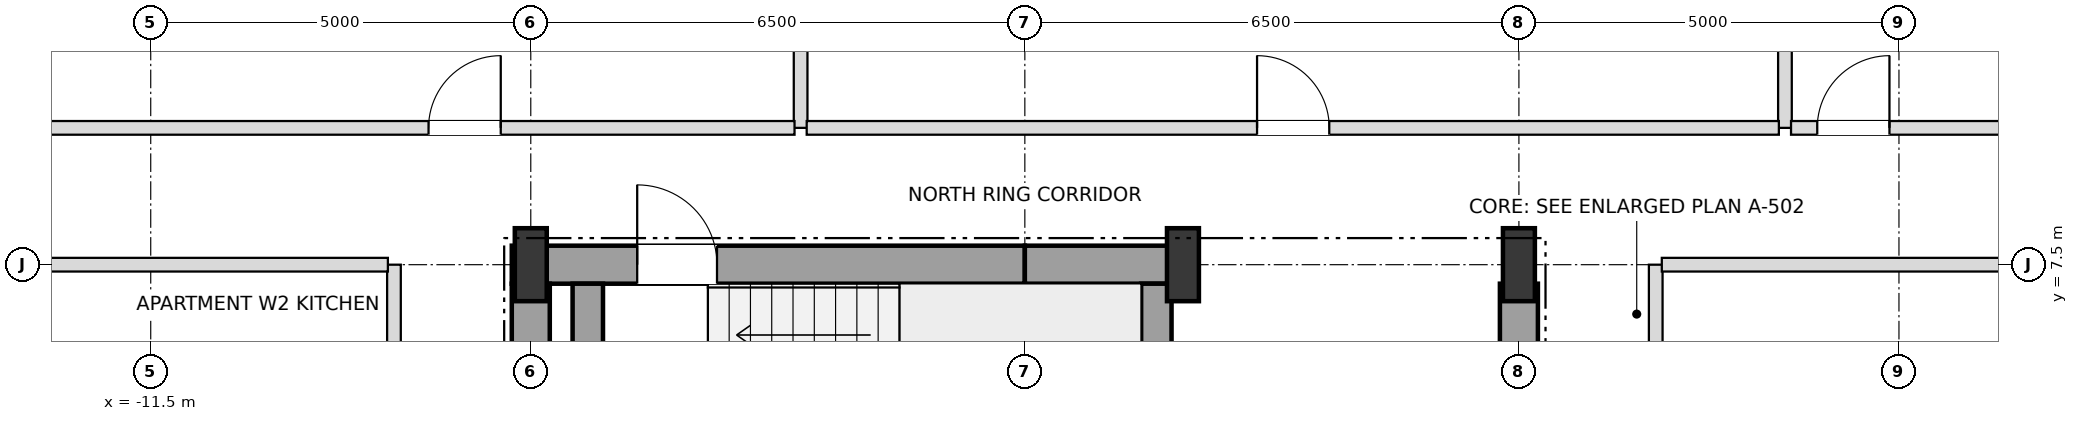
"""IFC4 building model, lengths in metres.
Left out: names, types, materials, properties, quantities, classifications, styles, units other than length and angle.
Written with IfcOpenShell. Run it as: python <this file> out.ifc"""

import sys

from ifc_helpers import new_model, si_unit, direction, frame, frame_2d, origin, origin_2d, place, context, subcontext, project, spatial, rectangle, i_section, extrude, element, fill, save


model = new_model("IFC4")
c1 = context("Model", 3, precision=1e-05, world=origin(), true_north=direction((0.0, 1.0)))
c2 = subcontext(c1, "Body", "Model", "MODEL_VIEW")
j1 = project(units=[si_unit("LENGTHUNIT", "METRE"), si_unit("PLANEANGLEUNIT", "RADIAN")], contexts=[c1])
p1 = place(None, origin())
s1 = spatial("IfcSite", under=j1, at=p1, CompositionType="ELEMENT")
p2 = place(p1, origin())
s2 = spatial("IfcBuilding", under=s1, at=p2, CompositionType="ELEMENT")
p3 = place(p2, frame((0.0, 0.0, 54.0)))
s3 = spatial("IfcBuildingStorey", under=s2, at=p3, CompositionType="ELEMENT", Elevation=54.0)
for number, where, z_axis, x_axis in (
    (1, (-6.5, 7.5, 0.0), (0.0, 0.0, 1.0), (1.0, 0.0, 0.0)),
    (2, (2.08, 7.5, 0.0), (0.0, 0.0, 1.0), (1.0, 0.0, 0.0)),
    (3, (6.5, 7.5, 0.0), (0.0, 0.0, 1.0), (1.0, 0.0, 0.0)),
):
    element("IfcColumn", number, at=place(p3, frame(where, z_axis=z_axis, x_axis=x_axis)), inside=s3, PredefinedType="COLUMN", context=c2, shape_type="SweptSolid", body=[
        extrude(i_section(OverallWidth=0.42, OverallDepth=0.96, WebThickness=0.022, FlangeThickness=0.034, at=origin_2d()), origin(), (0.0, 0.0, 1.0), 3.6),
    ])
p4 = place(p3, frame((-6.75, 7.5, 0.0), z_axis=(0.0, 0.0, 1.0), x_axis=(1.0, 0.0, 0.0)))
e4 = element("IfcWall", 4, at=p4, inside=s3, PredefinedType="SHEAR", context=c2, shape_type="SweptSolid", body=[
    extrude(rectangle(XDim=6.75, YDim=0.5, at=frame_2d((3.375, 0.0))), origin(), (0.0, 0.0, 1.0), 3.38),
])
p5 = place(p4, frame((1.65, 0.0, 0.0)))
e5 = element("IfcOpeningElement", 5, at=p5, cuts=e4, PredefinedType="OPENING", context=c2, shape_type="SweptSolid", body=[
    extrude(rectangle(XDim=1.05, YDim=2.15, at=frame_2d((0.525, 1.075))), frame((0.0, 0.26, 0.0), z_axis=(0.0, -1.0, 0.0), x_axis=(1.0, 0.0, 0.0)), (0.0, 0.0, 1.0), 0.52),
])
p6 = place(p3, frame((0.0, 7.5, 0.0), z_axis=(0.0, 0.0, 1.0), x_axis=(1.0, 0.0, 0.0)))
e6 = element("IfcWall", 6, at=p6, inside=s3, PredefinedType="SHEAR", context=c2, shape_type="SweptSolid", body=[
    extrude(rectangle(XDim=2.08, YDim=0.5, at=frame_2d((1.04, 0.0))), origin(), (0.0, 0.0, 1.0), 3.38),
])
for number, where, z_axis, x_axis in (
    (7, (-6.5, 3.95, 0.0), (0.0, 0.0, 1.0), (0.0, 1.0, 0.0)),
    (8, (6.5, 3.95, 0.0), (0.0, 0.0, 1.0), (0.0, 1.0, 0.0)),
):
    element("IfcWall", number, at=place(p3, frame(where, z_axis=z_axis, x_axis=x_axis)), inside=s3, PredefinedType="SHEAR", context=c2, shape_type="SweptSolid", body=[
        extrude(rectangle(XDim=3.3, YDim=0.5, at=frame_2d((1.65, 0.0))), origin(), (0.0, 0.0, 1.0), 3.38),
    ])
for number, where, z_axis, x_axis in (
    (9, (1.73, 3.95, 0.0), (0.0, 0.0, 1.0), (0.0, 1.0, 0.0)),
    (10, (-5.75, 3.95, 0.0), (0.0, 0.0, 1.0), (0.0, 1.0, 0.0)),
):
    element("IfcWall", number, at=place(p3, frame(where, z_axis=z_axis, x_axis=x_axis)), inside=s3, PredefinedType="SHEAR", context=c2, shape_type="SweptSolid", body=[
        extrude(rectangle(XDim=3.3, YDim=0.4, at=frame_2d((1.65, 0.0))), origin(), (0.0, 0.0, 1.0), 3.38),
    ])
p7 = place(p3, frame((-8.3, -7.5, 0.0), z_axis=(0.0, 0.0, 1.0), x_axis=(0.0, 1.0, 0.0)))
e11 = element("IfcWall", 11, at=p7, inside=s3, PredefinedType="PARTITIONING", context=c2, shape_type="SweptSolid", body=[
    extrude(rectangle(XDim=15.0, YDim=0.18, at=frame_2d((7.5, 0.0))), origin(), (0.0, 0.0, 1.0), 3.38),
])
p8 = place(p7, frame((3.565, 0.0, 0.0)))
e12 = element("IfcOpeningElement", 12, at=p8, cuts=e11, PredefinedType="OPENING", context=c2, shape_type="SweptSolid", body=[
    extrude(rectangle(XDim=0.95, YDim=2.15, at=frame_2d((0.475, 1.075))), frame((0.0, 0.1, 0.0), z_axis=(0.0, -1.0, 0.0), x_axis=(1.0, 0.0, 0.0)), (0.0, 0.0, 1.0), 0.2),
])
p9 = place(p7, frame((11.145, 0.0, 0.0)))
e13 = element("IfcOpeningElement", 13, at=p9, cuts=e11, PredefinedType="OPENING", context=c2, shape_type="SweptSolid", body=[
    extrude(rectangle(XDim=0.95, YDim=2.15, at=frame_2d((0.475, 1.075))), frame((0.0, 0.1, 0.0), z_axis=(0.0, -1.0, 0.0), x_axis=(1.0, 0.0, 0.0)), (0.0, 0.0, 1.0), 0.2),
])
p10 = place(p3, frame((-2.95, 9.3, 0.0), z_axis=(0.0, 0.0, 1.0), x_axis=(0.0, 1.0, 0.0)))
e14 = element("IfcWall", 14, at=p10, inside=s3, PredefinedType="PARTITIONING", context=c2, shape_type="SweptSolid", body=[
    extrude(rectangle(XDim=15.6, YDim=0.18, at=frame_2d((7.8, 0.0))), origin(), (0.0, 0.0, 1.0), 2.816),
])
p11 = place(p3, frame((8.3, -7.5, 0.0), z_axis=(0.0, 0.0, 1.0), x_axis=(0.0, 1.0, 0.0)))
e15 = element("IfcWall", 15, at=p11, inside=s3, PredefinedType="PARTITIONING", context=c2, shape_type="SweptSolid", body=[
    extrude(rectangle(XDim=15.0, YDim=0.18, at=frame_2d((7.5, 0.0))), origin(), (0.0, 0.0, 1.0), 3.38),
])
p12 = place(p11, frame((3.475, 0.0, 0.0)))
e16 = element("IfcOpeningElement", 16, at=p12, cuts=e15, PredefinedType="OPENING", context=c2, shape_type="SweptSolid", body=[
    extrude(rectangle(XDim=0.95, YDim=2.15, at=frame_2d((0.475, 1.075))), frame((0.0, 0.1, 0.0), z_axis=(0.0, -1.0, 0.0), x_axis=(1.0, 0.0, 0.0)), (0.0, 0.0, 1.0), 0.2),
])
p13 = place(p3, frame((10.0, 9.3, 0.0), z_axis=(0.0, 0.0, 1.0), x_axis=(0.0, 1.0, 0.0)))
e17 = element("IfcWall", 17, at=p13, inside=s3, PredefinedType="PARTITIONING", context=c2, shape_type="SweptSolid", body=[
    extrude(rectangle(XDim=15.6, YDim=0.18, at=frame_2d((7.8, 0.0))), origin(), (0.0, 0.0, 1.0), 2.816),
])
p14 = place(p13, frame((8.635, 0.0, 0.0)))
e18 = element("IfcOpeningElement", 18, at=p14, cuts=e17, PredefinedType="OPENING", context=c2, shape_type="SweptSolid", body=[
    extrude(rectangle(XDim=0.95, YDim=2.15, at=frame_2d((0.475, 1.075))), frame((0.0, 0.1, 0.0), z_axis=(0.0, -1.0, 0.0), x_axis=(1.0, 0.0, 0.0)), (0.0, 0.0, 1.0), 0.2),
])
for number, where, z_axis, x_axis in (
    (19, (-16.02, 7.5, 0.0), (0.0, 0.0, 1.0), (1.0, 0.0, 0.0)),
    (20, (8.38, 7.5, 0.0), (0.0, 0.0, 1.0), (1.0, 0.0, 0.0)),
):
    element("IfcWall", number, at=place(p3, frame(where, z_axis=z_axis, x_axis=x_axis)), inside=s3, PredefinedType="PARTITIONING", context=c2, shape_type="SweptSolid", body=[
        extrude(rectangle(XDim=7.64, YDim=0.18, at=frame_2d((3.82, 0.0))), origin(), (0.0, 0.0, 1.0), 2.816),
    ])
p15 = place(p3, frame((-18.4, 9.3, 0.0), z_axis=(0.0, 0.0, 1.0), x_axis=(1.0, 0.0, 0.0)))
e21 = element("IfcWall", 21, at=p15, inside=s3, PredefinedType="PARTITIONING", context=c2, shape_type="SweptSolid", body=[
    extrude(rectangle(XDim=15.37, YDim=0.18, at=frame_2d((7.685, 0.0))), origin(), (0.0, 0.0, 1.0), 2.816),
])
p16 = place(p15, frame((10.555, 0.0, 0.0)))
e22 = element("IfcOpeningElement", 22, at=p16, cuts=e21, PredefinedType="OPENING", context=c2, shape_type="SweptSolid", body=[
    extrude(rectangle(XDim=0.95, YDim=2.15, at=frame_2d((0.475, 1.075))), frame((0.0, 0.1, 0.0), z_axis=(0.0, -1.0, 0.0), x_axis=(1.0, 0.0, 0.0)), (0.0, 0.0, 1.0), 0.2),
])
p17 = place(p3, frame((-2.87, 9.3, 0.0), z_axis=(0.0, 0.0, 1.0), x_axis=(1.0, 0.0, 0.0)))
e23 = element("IfcWall", 23, at=p17, inside=s3, PredefinedType="PARTITIONING", context=c2, shape_type="SweptSolid", body=[
    extrude(rectangle(XDim=12.79, YDim=0.18, at=frame_2d((6.395, 0.0))), origin(), (0.0, 0.0, 1.0), 2.816),
])
p18 = place(p17, frame((5.925, 0.0, 0.0)))
e24 = element("IfcOpeningElement", 24, at=p18, cuts=e23, PredefinedType="OPENING", context=c2, shape_type="SweptSolid", body=[
    extrude(rectangle(XDim=0.95, YDim=2.15, at=frame_2d((0.475, 1.075))), frame((0.0, 0.1, 0.0), z_axis=(0.0, -1.0, 0.0), x_axis=(1.0, 0.0, 0.0)), (0.0, 0.0, 1.0), 0.2),
])
p19 = place(p3, frame((10.08, 9.3, 0.0), z_axis=(0.0, 0.0, 1.0), x_axis=(1.0, 0.0, 0.0)))
e25 = element("IfcWall", 25, at=p19, inside=s3, PredefinedType="PARTITIONING", context=c2, shape_type="SweptSolid", body=[
    extrude(rectangle(XDim=8.24, YDim=0.18, at=frame_2d((4.12, 0.0))), origin(), (0.0, 0.0, 1.0), 2.816),
])
p20 = place(p19, frame((0.345, 0.0, 0.0)))
e26 = element("IfcOpeningElement", 26, at=p20, cuts=e25, PredefinedType="OPENING", context=c2, shape_type="SweptSolid", body=[
    extrude(rectangle(XDim=0.95, YDim=2.15, at=frame_2d((0.475, 1.075))), frame((0.0, 0.1, 0.0), z_axis=(0.0, -1.0, 0.0), x_axis=(1.0, 0.0, 0.0)), (0.0, 0.0, 1.0), 0.2),
])
p21 = place(p5, origin())
e27 = element("IfcDoor", 27, at=p21, inside=s3, OperationType="SINGLE_SWING_LEFT", PredefinedType="DOOR", context=c2, shape_type="SweptSolid", body=[
    extrude(rectangle(XDim=1.05, YDim=2.15, at=frame_2d((0.525, 1.075))), frame((0.0, 0.025, 0.0), z_axis=(0.0, -1.0, 0.0), x_axis=(1.0, 0.0, 0.0)), (0.0, 0.0, 1.0), 0.05),
])
fill(e5, e27)
p22 = place(p20, origin())
e28 = element("IfcDoor", 28, at=p22, inside=s3, OperationType="SINGLE_SWING_RIGHT", PredefinedType="DOOR", context=c2, shape_type="SweptSolid", body=[
    extrude(rectangle(XDim=0.95, YDim=2.15, at=frame_2d((0.475, 1.075))), frame((0.0, 0.025, 0.0), z_axis=(0.0, -1.0, 0.0), x_axis=(1.0, 0.0, 0.0)), (0.0, 0.0, 1.0), 0.05),
])
fill(e26, e28)
p23 = place(p16, origin())
e29 = element("IfcDoor", 29, at=p23, inside=s3, OperationType="SINGLE_SWING_RIGHT", PredefinedType="DOOR", context=c2, shape_type="SweptSolid", body=[
    extrude(rectangle(XDim=0.95, YDim=2.15, at=frame_2d((0.475, 1.075))), frame((0.0, 0.025, 0.0), z_axis=(0.0, -1.0, 0.0), x_axis=(1.0, 0.0, 0.0)), (0.0, 0.0, 1.0), 0.05),
])
fill(e22, e29)
p24 = place(p18, origin())
e30 = element("IfcDoor", 30, at=p24, inside=s3, OperationType="SINGLE_SWING_LEFT", PredefinedType="DOOR", context=c2, shape_type="SweptSolid", body=[
    extrude(rectangle(XDim=0.95, YDim=2.15, at=frame_2d((0.475, 1.075))), frame((0.0, 0.025, 0.0), z_axis=(0.0, -1.0, 0.0), x_axis=(1.0, 0.0, 0.0)), (0.0, 0.0, 1.0), 0.05),
])
fill(e24, e30)
save(model, sys.argv[1])
